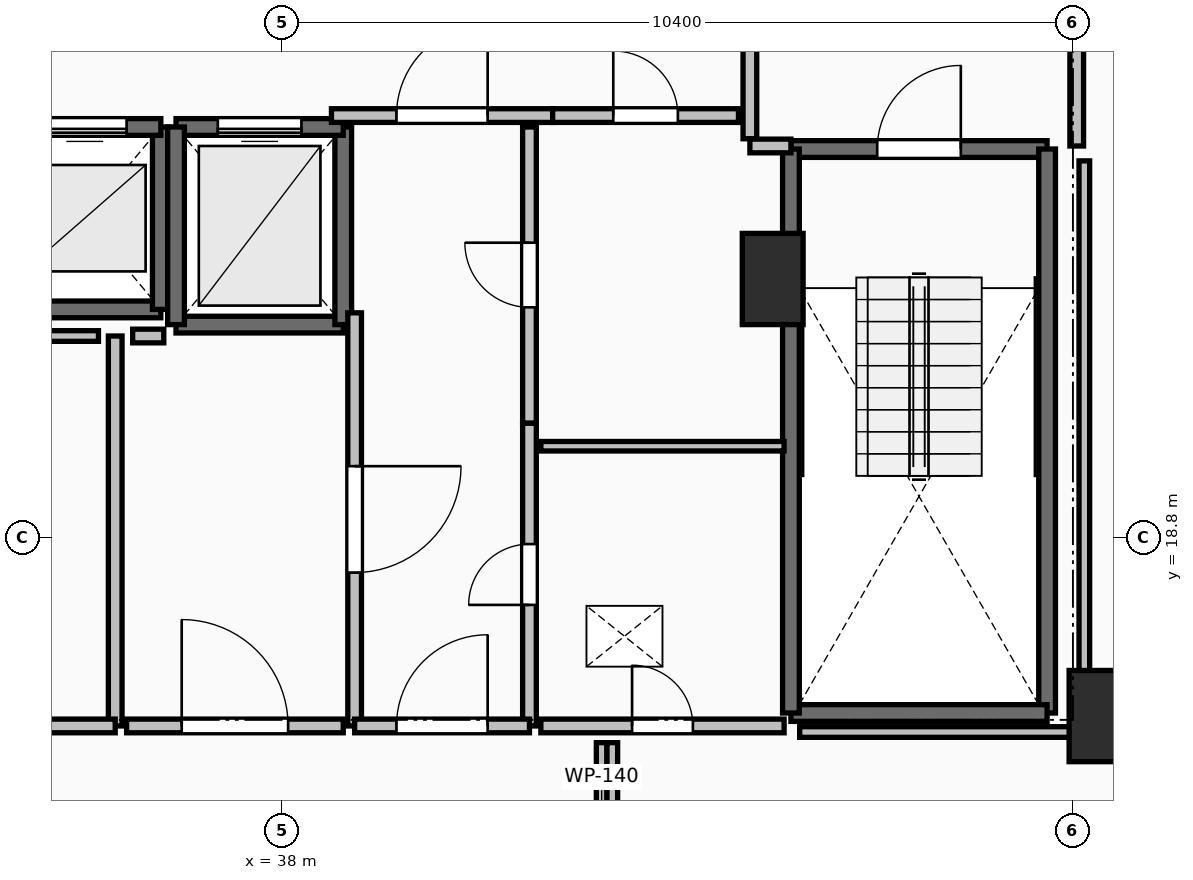
"""IFC4 building model, lengths in metres.
Left out: names, types, materials, properties, quantities, classifications, styles, units other than length and angle.
Written with IfcOpenShell. Run it as: python <this file> out.ifc"""

import sys

from ifc_helpers import new_model, si_unit, direction, frame, frame_2d, origin, origin_2d, place, context, subcontext, project, spatial, rectangle, extrude, element, fill, save


model = new_model("IFC4")
c1 = context("Model", 3, precision=1e-05, world=origin(), true_north=direction((0.0, 1.0)))
c2 = subcontext(c1, "Body", "Model", "MODEL_VIEW")
j1 = project(units=[si_unit("LENGTHUNIT", "METRE"), si_unit("PLANEANGLEUNIT", "RADIAN")], contexts=[c1])
p1 = place(None, origin())
s1 = spatial("IfcSite", under=j1, at=p1, CompositionType="ELEMENT")
p2 = place(p1, origin())
s2 = spatial("IfcBuilding", under=s1, at=p2, CompositionType="ELEMENT")
p3 = place(p2, frame((0.0, 0.0, 139.6)))
s3 = spatial("IfcBuildingStorey", under=s2, at=p3, CompositionType="ELEMENT", Elevation=139.6)
for number, where, z_axis, x_axis in (
    (1, (48.75, 16.45, 0.0), (0.0, 0.0, 1.0), (1.0, 0.0, 0.0)),
    (2, (44.45, 22.2, 0.0), (0.0, 0.0, 1.0), (1.0, 0.0, 0.0)),
):
    element("IfcColumn", number, at=place(p3, frame(where, z_axis=z_axis, x_axis=x_axis)), inside=s3, PredefinedType="PILASTER", context=c2, shape_type="SweptSolid", body=[
        extrude(rectangle(XDim=0.8, YDim=1.2, at=origin_2d()), origin(), (0.0, 0.0, 1.0), 3.5),
    ])
p4 = place(p3, frame((44.69, 23.91, 0.0), z_axis=(0.0, 0.0, 1.0), x_axis=(1.0, 0.0, 0.0)))
e3 = element("IfcWall", 3, at=p4, inside=s3, PredefinedType="SOLIDWALL", context=c2, shape_type="SweptSolid", body=[
    extrude(rectangle(XDim=3.37, YDim=0.22, at=frame_2d((1.685, 0.0))), origin(), (0.0, 0.0, 1.0), 3.24),
])
p5 = place(p4, frame((1.135, 0.0, 0.0)))
e4 = element("IfcOpeningElement", 4, at=p5, cuts=e3, PredefinedType="OPENING", context=c2, shape_type="SweptSolid", body=[
    extrude(rectangle(XDim=1.1, YDim=2.15, at=frame_2d((0.55, 1.075))), frame((0.0, 0.125, 0.0), z_axis=(0.0, -1.0, 0.0), x_axis=(1.0, 0.0, 0.0)), (0.0, 0.0, 1.0), 0.25),
])
p6 = place(p3, frame((48.06, 23.91, 0.0), z_axis=(0.0, 0.0, 1.0), x_axis=(0.0, -1.0, 0.0)))
e5 = element("IfcWall", 5, at=p6, inside=s3, PredefinedType="SOLIDWALL", context=c2, shape_type="SweptSolid", body=[
    extrude(rectangle(XDim=7.42, YDim=0.22, at=frame_2d((3.71, 0.0))), origin(), (0.0, 0.0, 1.0), 3.24),
])
p7 = place(p3, frame((48.06, 16.49, 0.0), z_axis=(0.0, 0.0, 1.0), x_axis=(-1.0, 0.0, 0.0)))
e6 = element("IfcWall", 6, at=p7, inside=s3, PredefinedType="SOLIDWALL", context=c2, shape_type="SweptSolid", body=[
    extrude(rectangle(XDim=3.37, YDim=0.22, at=frame_2d((1.685, 0.0))), origin(), (0.0, 0.0, 1.0), 3.24),
])
p8 = place(p3, frame((44.69, 16.49, 0.0), z_axis=(0.0, 0.0, 1.0), x_axis=(0.0, 1.0, 0.0)))
e7 = element("IfcWall", 7, at=p8, inside=s3, PredefinedType="SOLIDWALL", context=c2, shape_type="SweptSolid", body=[
    extrude(rectangle(XDim=7.42, YDim=0.22, at=frame_2d((3.71, 0.0))), origin(), (0.0, 0.0, 1.0), 3.24),
])
p9 = place(p3, frame((34.4, 21.8, 0.0), z_axis=(0.0, 0.0, 1.0), x_axis=(1.0, 0.0, 0.0)))
e8 = element("IfcWall", 8, at=p9, inside=s3, PredefinedType="SOLIDWALL", context=c2, shape_type="SweptSolid", body=[
    extrude(rectangle(XDim=2.0, YDim=0.22, at=frame_2d((1.0, 0.0))), origin(), (0.0, 0.0, 1.0), 3.24),
])
p10 = place(p3, frame((36.4, 21.8, 0.0), z_axis=(0.0, 0.0, 1.0), x_axis=(0.0, 1.0, 0.0)))
e9 = element("IfcWall", 9, at=p10, inside=s3, PredefinedType="SOLIDWALL", context=c2, shape_type="SweptSolid", body=[
    extrude(rectangle(XDim=2.4, YDim=0.22, at=frame_2d((1.2, 0.0))), origin(), (0.0, 0.0, 1.0), 3.24),
])
p11 = place(p3, frame((36.4, 24.2, 0.0), z_axis=(0.0, 0.0, 1.0), x_axis=(-1.0, 0.0, 0.0)))
e10 = element("IfcWall", 10, at=p11, inside=s3, PredefinedType="SOLIDWALL", context=c2, shape_type="SweptSolid", body=[
    extrude(rectangle(XDim=2.0, YDim=0.22, at=frame_2d((1.0, 0.0))), origin(), (0.0, 0.0, 1.0), 3.24),
])
p12 = place(p11, frame((0.45, 0.0, 0.0)))
e11 = element("IfcOpeningElement", 11, at=p12, cuts=e10, PredefinedType="OPENING", context=c2, shape_type="SweptSolid", body=[
    extrude(rectangle(XDim=1.1, YDim=2.2, at=frame_2d((0.55, 1.1))), frame((0.0, 0.125, 0.0), z_axis=(0.0, -1.0, 0.0), x_axis=(1.0, 0.0, 0.0)), (0.0, 0.0, 1.0), 0.25),
])
p13 = place(p3, frame((36.6, 21.6, 0.0), z_axis=(0.0, 0.0, 1.0), x_axis=(1.0, 0.0, 0.0)))
e12 = element("IfcWall", 12, at=p13, inside=s3, PredefinedType="SOLIDWALL", context=c2, shape_type="SweptSolid", body=[
    extrude(rectangle(XDim=2.2, YDim=0.22, at=frame_2d((1.1, 0.0))), origin(), (0.0, 0.0, 1.0), 3.24),
])
p14 = place(p3, frame((38.8, 21.6, 0.0), z_axis=(0.0, 0.0, 1.0), x_axis=(0.0, 1.0, 0.0)))
e13 = element("IfcWall", 13, at=p14, inside=s3, PredefinedType="SOLIDWALL", context=c2, shape_type="SweptSolid", body=[
    extrude(rectangle(XDim=2.6, YDim=0.22, at=frame_2d((1.3, 0.0))), origin(), (0.0, 0.0, 1.0), 3.24),
])
p15 = place(p3, frame((38.8, 24.2, 0.0), z_axis=(0.0, 0.0, 1.0), x_axis=(-1.0, 0.0, 0.0)))
e14 = element("IfcWall", 14, at=p15, inside=s3, PredefinedType="SOLIDWALL", context=c2, shape_type="SweptSolid", body=[
    extrude(rectangle(XDim=2.2, YDim=0.22, at=frame_2d((1.1, 0.0))), origin(), (0.0, 0.0, 1.0), 3.24),
])
p16 = place(p15, frame((0.55, 0.0, 0.0)))
e15 = element("IfcOpeningElement", 15, at=p16, cuts=e14, PredefinedType="OPENING", context=c2, shape_type="SweptSolid", body=[
    extrude(rectangle(XDim=1.1, YDim=2.2, at=frame_2d((0.55, 1.1))), frame((0.0, 0.125, 0.0), z_axis=(0.0, -1.0, 0.0), x_axis=(1.0, 0.0, 0.0)), (0.0, 0.0, 1.0), 0.25),
])
p17 = place(p3, frame((36.6, 24.2, 0.0), z_axis=(0.0, 0.0, 1.0), x_axis=(0.0, -1.0, 0.0)))
e16 = element("IfcWall", 16, at=p17, inside=s3, PredefinedType="SOLIDWALL", context=c2, shape_type="SweptSolid", body=[
    extrude(rectangle(XDim=2.6, YDim=0.22, at=frame_2d((1.3, 0.0))), origin(), (0.0, 0.0, 1.0), 3.24),
])
p18 = place(p3, frame((44.15, 27.955, 0.0), z_axis=(0.0, 0.0, 1.0), x_axis=(0.0, -1.0, 0.0)))
e17 = element("IfcWall", 17, at=p18, inside=s3, PredefinedType="PARTITIONING", context=c2, shape_type="SweptSolid", body=[
    extrude(rectangle(XDim=3.91, YDim=0.18, at=frame_2d((1.955, 0.0))), origin(), (0.0, 0.0, 1.0), 3.24),
])
p19 = place(p18, frame((1.355, 0.0, 0.0)))
e18 = element("IfcOpeningElement", 18, at=p19, cuts=e17, PredefinedType="OPENING", context=c2, shape_type="SweptSolid", body=[
    extrude(rectangle(XDim=1.2, YDim=2.15, at=frame_2d((0.6, 1.075))), frame((0.0, 0.105, 0.0), z_axis=(0.0, -1.0, 0.0), x_axis=(1.0, 0.0, 0.0)), (0.0, 0.0, 1.0), 0.21),
])
p20 = place(p3, frame((44.15, 23.95, 0.0), z_axis=(0.0, 0.0, 1.0), x_axis=(1.0, 0.0, 0.0)))
e19 = element("IfcWall", 19, at=p20, inside=s3, PredefinedType="PARTITIONING", context=c2, shape_type="SweptSolid", body=[
    extrude(rectangle(XDim=0.54, YDim=0.18, at=frame_2d((0.27, 0.0))), origin(), (0.0, 0.0, 1.0), 3.24),
])
p21 = place(p3, frame((48.45, 23.95, 0.0), z_axis=(0.0, 0.0, 1.0), x_axis=(0.0, 1.0, 0.0)))
e20 = element("IfcWall", 20, at=p21, inside=s3, PredefinedType="PARTITIONING", context=c2, shape_type="SweptSolid", body=[
    extrude(rectangle(XDim=4.05, YDim=0.18, at=frame_2d((2.025, 0.0))), origin(), (0.0, 0.0, 1.0), 3.24),
])
p22 = place(p21, frame((1.425, 0.0, 0.0)))
e21 = element("IfcOpeningElement", 21, at=p22, cuts=e20, PredefinedType="OPENING", context=c2, shape_type="SweptSolid", body=[
    extrude(rectangle(XDim=1.2, YDim=2.15, at=frame_2d((0.6, 1.075))), frame((0.0, 0.105, 0.0), z_axis=(0.0, -1.0, 0.0), x_axis=(1.0, 0.0, 0.0)), (0.0, 0.0, 1.0), 0.21),
])
p23 = place(p3, frame((38.645, 24.35, 0.0), z_axis=(0.0, 0.0, 1.0), x_axis=(1.0, 0.0, 0.0)))
e22 = element("IfcWall", 22, at=p23, inside=s3, PredefinedType="PARTITIONING", context=c2, shape_type="SweptSolid", body=[
    extrude(rectangle(XDim=2.91, YDim=0.18, at=frame_2d((1.455, 0.0))), origin(), (0.0, 0.0, 1.0), 3.24),
])
p24 = place(p23, frame((0.855, 0.0, 0.0)))
e23 = element("IfcOpeningElement", 23, at=p24, cuts=e22, PredefinedType="OPENING", context=c2, shape_type="SweptSolid", body=[
    extrude(rectangle(XDim=1.2, YDim=2.15, at=frame_2d((0.6, 1.075))), frame((0.0, 0.105, 0.0), z_axis=(0.0, -1.0, 0.0), x_axis=(1.0, 0.0, 0.0)), (0.0, 0.0, 1.0), 0.21),
])
p25 = place(p3, frame((41.555, 24.35, 0.0), z_axis=(0.0, 0.0, 1.0), x_axis=(1.0, 0.0, 0.0)))
e24 = element("IfcWall", 24, at=p25, inside=s3, PredefinedType="PARTITIONING", context=c2, shape_type="SweptSolid", body=[
    extrude(rectangle(XDim=2.445, YDim=0.18, at=frame_2d((1.223, 0.0))), origin(), (0.0, 0.0, 1.0), 3.24),
])
p26 = place(p25, frame((0.798, 0.0, 0.0)))
e25 = element("IfcOpeningElement", 25, at=p26, cuts=e24, PredefinedType="OPENING", context=c2, shape_type="SweptSolid", body=[
    extrude(rectangle(XDim=0.85, YDim=2.1, at=frame_2d((0.425, 1.05))), frame((0.0, 0.105, 0.0), z_axis=(0.0, -1.0, 0.0), x_axis=(1.0, 0.0, 0.0)), (0.0, 0.0, 1.0), 0.21),
])
p27 = place(p3, frame((41.25, 16.32, 0.0), z_axis=(0.0, 0.0, 1.0), x_axis=(0.0, 1.0, 0.0)))
e26 = element("IfcWall", 26, at=p27, inside=s3, PredefinedType="PARTITIONING", context=c2, shape_type="SweptSolid", body=[
    extrude(rectangle(XDim=3.985, YDim=0.18, at=frame_2d((1.992, 0.0))), origin(), (0.0, 0.0, 1.0), 3.24),
])
p28 = place(p27, frame((1.593, 0.0, 0.0)))
e27 = element("IfcOpeningElement", 27, at=p28, cuts=e26, PredefinedType="OPENING", context=c2, shape_type="SweptSolid", body=[
    extrude(rectangle(XDim=0.8, YDim=2.05, at=frame_2d((0.4, 1.025))), frame((0.0, 0.105, 0.0), z_axis=(0.0, -1.0, 0.0), x_axis=(1.0, 0.0, 0.0)), (0.0, 0.0, 1.0), 0.21),
])
p29 = place(p3, frame((41.25, 20.305, 0.0), z_axis=(0.0, 0.0, 1.0), x_axis=(0.0, 1.0, 0.0)))
e28 = element("IfcWall", 28, at=p29, inside=s3, PredefinedType="PARTITIONING", context=c2, shape_type="SweptSolid", body=[
    extrude(rectangle(XDim=3.895, YDim=0.18, at=frame_2d((1.948, 0.0))), origin(), (0.0, 0.0, 1.0), 3.24),
])
p30 = place(p29, frame((1.522, 0.0, 0.0)))
e29 = element("IfcOpeningElement", 29, at=p30, cuts=e28, PredefinedType="OPENING", context=c2, shape_type="SweptSolid", body=[
    extrude(rectangle(XDim=0.85, YDim=2.1, at=frame_2d((0.425, 1.05))), frame((0.0, 0.105, 0.0), z_axis=(0.0, -1.0, 0.0), x_axis=(1.0, 0.0, 0.0)), (0.0, 0.0, 1.0), 0.21),
])
p31 = place(p3, frame((38.95, 21.755, 0.0), z_axis=(0.0, 0.0, 1.0), x_axis=(0.0, -1.0, 0.0)))
e30 = element("IfcWall", 30, at=p31, inside=s3, PredefinedType="PARTITIONING", context=c2, shape_type="SweptSolid", body=[
    extrude(rectangle(XDim=5.435, YDim=0.18, at=frame_2d((2.717, 0.0))), origin(), (0.0, 0.0, 1.0), 3.24),
])
p32 = place(p31, frame((2.018, 0.0, 0.0)))
e31 = element("IfcOpeningElement", 31, at=p32, cuts=e30, PredefinedType="OPENING", context=c2, shape_type="SweptSolid", body=[
    extrude(rectangle(XDim=1.4, YDim=2.2, at=frame_2d((0.7, 1.1))), frame((0.0, 0.105, 0.0), z_axis=(0.0, -1.0, 0.0), x_axis=(1.0, 0.0, 0.0)), (0.0, 0.0, 1.0), 0.21),
])
p33 = place(p3, frame((38.95, 16.32, 0.0), z_axis=(0.0, 0.0, 1.0), x_axis=(1.0, 0.0, 0.0)))
e32 = element("IfcWall", 32, at=p33, inside=s3, PredefinedType="PARTITIONING", context=c2, shape_type="SweptSolid", body=[
    extrude(rectangle(XDim=2.3, YDim=0.18, at=frame_2d((1.15, 0.0))), origin(), (0.0, 0.0, 1.0), 3.24),
])
p34 = place(p33, frame((0.55, 0.0, 0.0)))
e33 = element("IfcOpeningElement", 33, at=p34, cuts=e32, PredefinedType="OPENING", context=c2, shape_type="SweptSolid", body=[
    extrude(rectangle(XDim=1.2, YDim=2.15, at=frame_2d((0.6, 1.075))), frame((0.0, 0.105, 0.0), z_axis=(0.0, -1.0, 0.0), x_axis=(1.0, 0.0, 0.0)), (0.0, 0.0, 1.0), 0.21),
])
p35 = place(p3, frame((44.6, 20.0, 0.0), z_axis=(0.0, 0.0, 1.0), x_axis=(-1.0, 0.0, 0.0)))
e34 = element("IfcWall", 34, at=p35, inside=s3, PredefinedType="PARTITIONING", context=c2, shape_type="SweptSolid", body=[
    extrude(rectangle(XDim=3.2, YDim=0.125, at=frame_2d((1.6, 0.0))), origin(), (0.0, 0.0, 1.0), 3.24),
])
p36 = place(p3, frame((41.4, 16.32, 0.0), z_axis=(0.0, 0.0, 1.0), x_axis=(1.0, 0.0, 0.0)))
e35 = element("IfcWall", 35, at=p36, inside=s3, PredefinedType="PARTITIONING", context=c2, shape_type="SweptSolid", body=[
    extrude(rectangle(XDim=3.2, YDim=0.18, at=frame_2d((1.6, 0.0))), origin(), (0.0, 0.0, 1.0), 3.24),
])
p37 = place(p36, frame((1.2, 0.0, 0.0)))
e36 = element("IfcOpeningElement", 36, at=p37, cuts=e35, PredefinedType="OPENING", context=c2, shape_type="SweptSolid", body=[
    extrude(rectangle(XDim=0.8, YDim=2.05, at=frame_2d((0.4, 1.025))), frame((0.0, 0.105, 0.0), z_axis=(0.0, -1.0, 0.0), x_axis=(1.0, 0.0, 0.0)), (0.0, 0.0, 1.0), 0.21),
])
p38 = place(p3, frame((35.8, 16.32, 0.0), z_axis=(0.0, 0.0, 1.0), x_axis=(0.0, 1.0, 0.0)))
e37 = element("IfcWall", 37, at=p38, inside=s3, PredefinedType="PARTITIONING", context=c2, shape_type="SweptSolid", body=[
    extrude(rectangle(XDim=5.13, YDim=0.18, at=frame_2d((2.565, 0.0))), origin(), (0.0, 0.0, 1.0), 3.24),
])
p39 = place(p3, frame((31.4, 16.32, 0.0), z_axis=(0.0, 0.0, 1.0), x_axis=(1.0, 0.0, 0.0)))
e38 = element("IfcWall", 38, at=p39, inside=s3, PredefinedType="PARTITIONING", context=c2, shape_type="SweptSolid", body=[
    extrude(rectangle(XDim=4.4, YDim=0.18, at=frame_2d((2.2, 0.0))), origin(), (0.0, 0.0, 1.0), 3.24),
])
p40 = place(p39, frame((1.775, 0.0, 0.0)))
e39 = element("IfcOpeningElement", 39, at=p40, cuts=e38, PredefinedType="OPENING", context=c2, shape_type="SweptSolid", body=[
    extrude(rectangle(XDim=0.85, YDim=2.1, at=frame_2d((0.425, 1.05))), frame((0.0, 0.105, 0.0), z_axis=(0.0, -1.0, 0.0), x_axis=(1.0, 0.0, 0.0)), (0.0, 0.0, 1.0), 0.21),
])
p41 = place(p3, frame((35.95, 16.32, 0.0), z_axis=(0.0, 0.0, 1.0), x_axis=(1.0, 0.0, 0.0)))
e40 = element("IfcWall", 40, at=p41, inside=s3, PredefinedType="PARTITIONING", context=c2, shape_type="SweptSolid", body=[
    extrude(rectangle(XDim=2.85, YDim=0.18, at=frame_2d((1.425, 0.0))), origin(), (0.0, 0.0, 1.0), 3.24),
])
p42 = place(p41, frame((0.725, 0.0, 0.0)))
e41 = element("IfcOpeningElement", 41, at=p42, cuts=e40, PredefinedType="OPENING", context=c2, shape_type="SweptSolid", body=[
    extrude(rectangle(XDim=1.4, YDim=2.2, at=frame_2d((0.7, 1.1))), frame((0.0, 0.105, 0.0), z_axis=(0.0, -1.0, 0.0), x_axis=(1.0, 0.0, 0.0)), (0.0, 0.0, 1.0), 0.21),
])
p43 = place(p3, frame((35.58, 21.45, 0.0), z_axis=(0.0, 0.0, 1.0), x_axis=(-1.0, 0.0, 0.0)))
e42 = element("IfcWall", 42, at=p43, inside=s3, PredefinedType="PARTITIONING", context=c2, shape_type="SweptSolid", body=[
    extrude(rectangle(XDim=4.05, YDim=0.14, at=frame_2d((2.025, 0.0))), origin(), (0.0, 0.0, 1.0), 3.24),
])
p44 = place(p3, frame((36.439, 21.45, 0.0), z_axis=(0.0, 0.0, 1.0), x_axis=(-1.0, 0.0, 0.0)))
e43 = element("IfcWall", 43, at=p44, inside=s3, PredefinedType="PARTITIONING", context=c2, shape_type="SweptSolid", body=[
    extrude(rectangle(XDim=0.409, YDim=0.18, at=frame_2d((0.205, 0.0))), origin(), (0.0, 0.0, 1.0), 3.24),
])
p45 = place(p3, frame((48.55, 16.24, 0.0), z_axis=(0.0, 0.0, 1.0), x_axis=(0.0, 1.0, 0.0)))
e44 = element("IfcWall", 44, at=p45, inside=s3, PredefinedType="PARTITIONING", context=c2, shape_type="SweptSolid", body=[
    extrude(rectangle(XDim=7.514, YDim=0.14, at=frame_2d((3.757, 0.0))), origin(), (0.0, 0.0, 1.0), 2.432),
])
for number, where, z_axis, x_axis in (
    (45, (42.2, 16.1, 0.0), (0.0, 0.0, 1.0), (0.0, -1.0, 0.0)),
    (46, (42.34, 14.27, 0.0), (0.0, 0.0, 1.0), (0.0, 1.0, 0.0)),
):
    element("IfcWall", number, at=place(p3, frame(where, z_axis=z_axis, x_axis=x_axis)), inside=s3, PredefinedType="PARTITIONING", context=c2, shape_type="SweptSolid", body=[
        extrude(rectangle(XDim=1.83, YDim=0.14, at=frame_2d((0.915, 0.0))), origin(), (0.0, 0.0, 1.0), 3.24),
    ])
p46 = place(p3, frame((44.805, 16.24, 0.0), z_axis=(0.0, 0.0, 1.0), x_axis=(1.0, 0.0, 0.0)))
e47 = element("IfcWall", 47, at=p46, inside=s3, PredefinedType="PARTITIONING", context=c2, shape_type="SweptSolid", body=[
    extrude(rectangle(XDim=3.745, YDim=0.14, at=frame_2d((1.873, 0.0))), origin(), (0.0, 0.0, 1.0), 2.432),
])
p47 = place(p5, origin())
e48 = element("IfcDoor", 48, at=p47, inside=s3, OperationType="SINGLE_SWING_RIGHT", PredefinedType="DOOR", context=c2, shape_type="SweptSolid", body=[
    extrude(rectangle(XDim=1.1, YDim=2.15, at=frame_2d((0.55, 1.075))), frame((0.0, 0.025, 0.0), z_axis=(0.0, -1.0, 0.0), x_axis=(1.0, 0.0, 0.0)), (0.0, 0.0, 1.0), 0.05),
])
fill(e4, e48)
p48 = place(p12, origin())
e49 = element("IfcDoor", 49, at=p48, inside=s3, OperationType="SLIDING_TO_LEFT", PredefinedType="DOOR", context=c2, shape_type="SweptSolid", body=[
    extrude(rectangle(XDim=1.1, YDim=2.2, at=frame_2d((0.55, 1.1))), frame((0.0, 0.025, 0.0), z_axis=(0.0, -1.0, 0.0), x_axis=(1.0, 0.0, 0.0)), (0.0, 0.0, 1.0), 0.05),
])
fill(e11, e49)
p49 = place(p16, origin())
e50 = element("IfcDoor", 50, at=p49, inside=s3, OperationType="SLIDING_TO_LEFT", PredefinedType="DOOR", context=c2, shape_type="SweptSolid", body=[
    extrude(rectangle(XDim=1.1, YDim=2.2, at=frame_2d((0.55, 1.1))), frame((0.0, 0.025, 0.0), z_axis=(0.0, -1.0, 0.0), x_axis=(1.0, 0.0, 0.0)), (0.0, 0.0, 1.0), 0.05),
])
fill(e15, e50)
p50 = place(p24, origin())
e51 = element("IfcDoor", 51, at=p50, inside=s3, OperationType="SINGLE_SWING_RIGHT", PredefinedType="DOOR", context=c2, shape_type="SweptSolid", body=[
    extrude(rectangle(XDim=1.2, YDim=2.15, at=frame_2d((0.6, 1.075))), frame((0.0, 0.025, 0.0), z_axis=(0.0, -1.0, 0.0), x_axis=(1.0, 0.0, 0.0)), (0.0, 0.0, 1.0), 0.05),
])
fill(e23, e51)
p51 = place(p26, origin())
e52 = element("IfcDoor", 52, at=p51, inside=s3, OperationType="SINGLE_SWING_LEFT", PredefinedType="DOOR", context=c2, shape_type="SweptSolid", body=[
    extrude(rectangle(XDim=0.85, YDim=2.1, at=frame_2d((0.425, 1.05))), frame((0.0, 0.025, 0.0), z_axis=(0.0, -1.0, 0.0), x_axis=(1.0, 0.0, 0.0)), (0.0, 0.0, 1.0), 0.05),
])
fill(e25, e52)
p52 = place(p28, origin())
e53 = element("IfcDoor", 53, at=p52, inside=s3, OperationType="SINGLE_SWING_LEFT", PredefinedType="DOOR", context=c2, shape_type="SweptSolid", body=[
    extrude(rectangle(XDim=0.8, YDim=2.05, at=frame_2d((0.4, 1.025))), frame((0.0, 0.025, 0.0), z_axis=(0.0, -1.0, 0.0), x_axis=(1.0, 0.0, 0.0)), (0.0, 0.0, 1.0), 0.05),
])
fill(e27, e53)
p53 = place(p30, origin())
e54 = element("IfcDoor", 54, at=p53, inside=s3, OperationType="SINGLE_SWING_RIGHT", PredefinedType="DOOR", context=c2, shape_type="SweptSolid", body=[
    extrude(rectangle(XDim=0.85, YDim=2.1, at=frame_2d((0.425, 1.05))), frame((0.0, 0.025, 0.0), z_axis=(0.0, -1.0, 0.0), x_axis=(1.0, 0.0, 0.0)), (0.0, 0.0, 1.0), 0.05),
])
fill(e29, e54)
p54 = place(p32, origin())
e55 = element("IfcDoor", 55, at=p54, inside=s3, OperationType="DOUBLE_SWING_LEFT", PredefinedType="DOOR", context=c2, shape_type="SweptSolid", body=[
    extrude(rectangle(XDim=1.4, YDim=2.2, at=frame_2d((0.7, 1.1))), frame((0.0, 0.025, 0.0), z_axis=(0.0, -1.0, 0.0), x_axis=(1.0, 0.0, 0.0)), (0.0, 0.0, 1.0), 0.05),
])
fill(e31, e55)
p55 = place(p34, origin())
e56 = element("IfcDoor", 56, at=p55, inside=s3, OperationType="SINGLE_SWING_RIGHT", PredefinedType="DOOR", context=c2, shape_type="SweptSolid", body=[
    extrude(rectangle(XDim=1.2, YDim=2.15, at=frame_2d((0.6, 1.075))), frame((0.0, 0.025, 0.0), z_axis=(0.0, -1.0, 0.0), x_axis=(1.0, 0.0, 0.0)), (0.0, 0.0, 1.0), 0.05),
])
fill(e33, e56)
p56 = place(p37, origin())
e57 = element("IfcDoor", 57, at=p56, inside=s3, OperationType="SINGLE_SWING_LEFT", PredefinedType="DOOR", context=c2, shape_type="SweptSolid", body=[
    extrude(rectangle(XDim=0.8, YDim=2.05, at=frame_2d((0.4, 1.025))), frame((0.0, 0.025, 0.0), z_axis=(0.0, -1.0, 0.0), x_axis=(1.0, 0.0, 0.0)), (0.0, 0.0, 1.0), 0.05),
])
fill(e36, e57)
p57 = place(p42, origin())
e58 = element("IfcDoor", 58, at=p57, inside=s3, OperationType="DOUBLE_SWING_LEFT", PredefinedType="DOOR", context=c2, shape_type="SweptSolid", body=[
    extrude(rectangle(XDim=1.4, YDim=2.2, at=frame_2d((0.7, 1.1))), frame((0.0, 0.025, 0.0), z_axis=(0.0, -1.0, 0.0), x_axis=(1.0, 0.0, 0.0)), (0.0, 0.0, 1.0), 0.05),
])
fill(e41, e58)
save(model, sys.argv[1])
